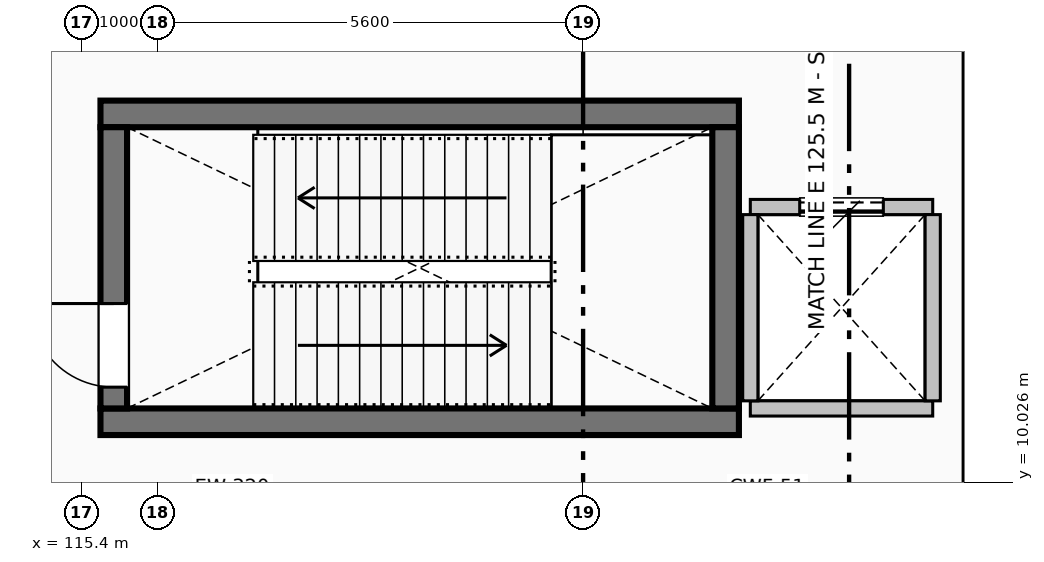
"""IFC4 building model, lengths in metres.
Left out: names, types, materials, properties, quantities, classifications, styles, units other than length and angle.
Written with IfcOpenShell. Run it as: python <this file> out.ifc"""

import sys

from ifc_helpers import new_model, si_unit, direction, frame, frame_2d, origin, place, context, subcontext, project, spatial, rectangle, extrude, element, fill, save


model = new_model("IFC4")
c1 = context("Model", 3, precision=1e-05, world=origin(), true_north=direction((0.0, 1.0)))
c2 = subcontext(c1, "Body", "Model", "MODEL_VIEW")
j1 = project(units=[si_unit("LENGTHUNIT", "METRE"), si_unit("PLANEANGLEUNIT", "RADIAN")], contexts=[c1])
p1 = place(None, origin())
s1 = spatial("IfcSite", under=j1, at=p1, CompositionType="ELEMENT")
p2 = place(p1, origin())
s2 = spatial("IfcBuilding", under=s1, at=p2, CompositionType="ELEMENT")
p3 = place(p2, origin())
s3 = spatial("IfcBuildingStorey", under=s2, at=p3, CompositionType="ELEMENT", Elevation=0.0)
for number, where, z_axis, x_axis in (
    (1, (115.65, 10.825, 0.0), (0.0, 0.0, 1.0), (1.0, 0.0, 0.0)),
    (2, (124.05, 14.875, 0.0), (0.0, 0.0, 1.0), (-1.0, 0.0, 0.0)),
):
    element("IfcWall", number, at=place(p3, frame(where, z_axis=z_axis, x_axis=x_axis)), inside=s3, PredefinedType="SHEAR", context=c2, shape_type="SweptSolid", body=[
        extrude(rectangle(XDim=8.4, YDim=0.35, at=frame_2d((4.2, 0.0))), origin(), (0.0, 0.0, 1.0), 5.1),
    ])
p4 = place(p3, frame((115.825, 11.0, 0.0), z_axis=(0.0, 0.0, 1.0), x_axis=(0.0, 1.0, 0.0)))
e3 = element("IfcWall", 3, at=p4, inside=s3, PredefinedType="SHEAR", context=c2, shape_type="SweptSolid", body=[
    extrude(rectangle(XDim=3.7, YDim=0.35, at=frame_2d((1.85, 0.0))), origin(), (0.0, 0.0, 1.0), 5.1),
])
p5 = place(p4, frame((0.28, 0.0, 0.0)))
e4 = element("IfcOpeningElement", 4, at=p5, cuts=e3, PredefinedType="OPENING", context=c2, shape_type="SweptSolid", body=[
    extrude(rectangle(XDim=1.1, YDim=2.08, at=frame_2d((0.55, 1.04))), frame((0.0, 0.185, 0.0), z_axis=(0.0, -1.0, 0.0), x_axis=(1.0, 0.0, 0.0)), (0.0, 0.0, 1.0), 0.37),
])
p6 = place(p3, frame((123.875, 14.7, 0.0), z_axis=(0.0, 0.0, 1.0), x_axis=(0.0, -1.0, 0.0)))
e5 = element("IfcWall", 5, at=p6, inside=s3, PredefinedType="SHEAR", context=c2, shape_type="SweptSolid", body=[
    extrude(rectangle(XDim=3.7, YDim=0.35, at=frame_2d((1.85, 0.0))), origin(), (0.0, 0.0, 1.0), 5.1),
])
p7 = place(p3, frame((124.2, 11.0, 0.0), z_axis=(0.0, 0.0, 1.0), x_axis=(1.0, 0.0, 0.0)))
e6 = element("IfcWall", 6, at=p7, inside=s3, PredefinedType="PARTITIONING", context=c2, shape_type="SweptSolid", body=[
    extrude(rectangle(XDim=2.4, YDim=0.2, at=frame_2d((1.2, 0.0))), origin(), (0.0, 0.0, 1.0), 5.092),
])
p8 = place(p3, frame((126.6, 13.65, 0.0), z_axis=(0.0, 0.0, 1.0), x_axis=(-1.0, 0.0, 0.0)))
e7 = element("IfcWall", 7, at=p8, inside=s3, PredefinedType="PARTITIONING", context=c2, shape_type="SweptSolid", body=[
    extrude(rectangle(XDim=2.4, YDim=0.2, at=frame_2d((1.2, 0.0))), origin(), (0.0, 0.0, 1.0), 5.092),
])
p9 = place(p8, frame((0.65, 0.0, 0.0)))
e8 = element("IfcOpeningElement", 8, at=p9, cuts=e7, PredefinedType="OPENING", context=c2, shape_type="SweptSolid", body=[
    extrude(rectangle(XDim=1.1, YDim=2.15, at=frame_2d((0.55, 1.075))), frame((0.0, 0.11, 0.0), z_axis=(0.0, -1.0, 0.0), x_axis=(1.0, 0.0, 0.0)), (0.0, 0.0, 1.0), 0.22),
])
for number, where, z_axis, x_axis in (
    (9, (124.2, 11.1, 0.0), (0.0, 0.0, 1.0), (0.0, 1.0, 0.0)),
    (10, (126.6, 13.55, 0.0), (0.0, 0.0, 1.0), (0.0, -1.0, 0.0)),
):
    element("IfcWall", number, at=place(p3, frame(where, z_axis=z_axis, x_axis=x_axis)), inside=s3, PredefinedType="PARTITIONING", context=c2, shape_type="SweptSolid", body=[
        extrude(rectangle(XDim=2.45, YDim=0.2, at=frame_2d((1.225, 0.0))), origin(), (0.0, 0.0, 1.0), 5.092),
    ])
p10 = place(p5, origin())
e11 = element("IfcDoor", 11, at=p10, inside=s3, OperationType="SINGLE_SWING_RIGHT", PredefinedType="DOOR", context=c2, shape_type="SweptSolid", body=[
    extrude(rectangle(XDim=1.1, YDim=2.08, at=frame_2d((0.55, 1.04))), frame((0.0, 0.025, 0.0), z_axis=(0.0, -1.0, 0.0), x_axis=(1.0, 0.0, 0.0)), (0.0, 0.0, 1.0), 0.05),
])
fill(e4, e11)
p11 = place(p9, origin())
e12 = element("IfcDoor", 12, at=p11, inside=s3, OperationType="SLIDING_TO_LEFT", PredefinedType="DOOR", context=c2, shape_type="SweptSolid", body=[
    extrude(rectangle(XDim=1.1, YDim=2.15, at=frame_2d((0.55, 1.075))), frame((0.0, 0.025, 0.0), z_axis=(0.0, -1.0, 0.0), x_axis=(1.0, 0.0, 0.0)), (0.0, 0.0, 1.0), 0.05),
])
fill(e8, e12)
save(model, sys.argv[1])
